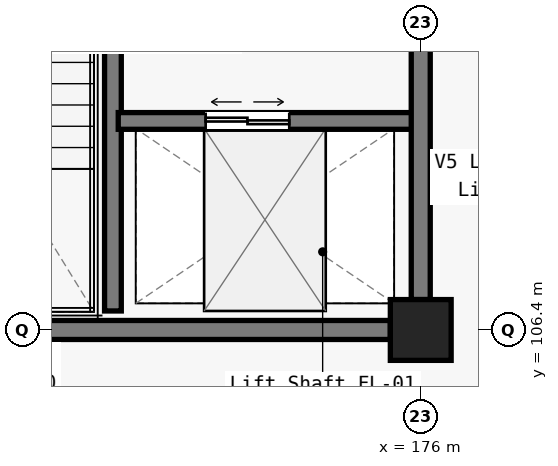
"""IFC4 building model, lengths in metres.
Left out: names, types, materials, properties, quantities, classifications, styles, units other than length and angle.
Written with IfcOpenShell. Run it as: python <this file> out.ifc"""

import sys

from ifc_helpers import new_model, si_unit, direction, frame, frame_2d, origin, origin_2d, place, context, subcontext, project, spatial, rectangle, circle, extrude, element, fill, save


model = new_model("IFC4")
c1 = context("Model", 3, precision=1e-05, world=origin(), true_north=direction((0.0, 1.0)))
c2 = subcontext(c1, "Body", "Model", "MODEL_VIEW")
j1 = project(units=[si_unit("LENGTHUNIT", "METRE"), si_unit("PLANEANGLEUNIT", "RADIAN")], contexts=[c1])
p1 = place(None, origin())
s1 = spatial("IfcSite", under=j1, at=p1, CompositionType="ELEMENT")
p2 = place(p1, origin())
s2 = spatial("IfcBuilding", under=s1, at=p2, CompositionType="ELEMENT")
p3 = place(p2, frame((0.0, 0.0, 19.8)))
s3 = spatial("IfcBuildingStorey", under=s2, at=p3, CompositionType="ELEMENT", Elevation=19.8)
p4 = place(p3, frame((176.0, 106.4, 0.0), z_axis=(0.0, 0.0, 1.0), x_axis=(1.0, 0.0, 0.0)))
e1 = element("IfcColumn", 1, at=p4, inside=s3, PredefinedType="COLUMN", context=c2, shape_type="SweptSolid", body=[
    extrude(circle(Radius=0.4, at=origin_2d()), origin(), (0.0, 0.0, 1.0), 4.8),
])
p5 = place(p3, frame((168.25, 106.4, 0.0), z_axis=(0.0, 0.0, 1.0), x_axis=(1.0, 0.0, 0.0)))
e2 = element("IfcWall", 2, at=p5, inside=s3, PredefinedType="SOLIDWALL", context=c2, shape_type="SweptSolid", body=[
    extrude(rectangle(XDim=7.35, YDim=0.25, at=frame_2d((3.675, 0.0))), origin(), (0.0, 0.0, 1.0), 3.665),
])
p6 = place(p3, frame((171.95, 106.65, 0.0), z_axis=(0.0, 0.0, 1.0), x_axis=(0.0, 1.0, 0.0)))
e3 = element("IfcWall", 3, at=p6, inside=s3, PredefinedType="SOLIDWALL", context=c2, shape_type="SweptSolid", body=[
    extrude(rectangle(XDim=7.1, YDim=0.22, at=frame_2d((3.55, 0.0))), origin(), (0.0, 0.0, 1.0), 4.54),
])
p7 = place(p6, frame((5.55, 0.0, 0.0)))
e4 = element("IfcOpeningElement", 4, at=p7, cuts=e3, PredefinedType="OPENING", context=c2, shape_type="SweptSolid", body=[
    extrude(rectangle(XDim=1.2, YDim=2.15, at=frame_2d((0.6, 1.075))), frame((0.0, 0.12, 0.0), z_axis=(0.0, -1.0, 0.0), x_axis=(1.0, 0.0, 0.0)), (0.0, 0.0, 1.0), 0.24),
])
p8 = place(p3, frame((172.02, 109.15, 0.0), z_axis=(0.0, 0.0, 1.0), x_axis=(1.0, 0.0, 0.0)))
e5 = element("IfcWall", 5, at=p8, inside=s3, PredefinedType="SOLIDWALL", context=c2, shape_type="SweptSolid", body=[
    extrude(rectangle(XDim=3.93, YDim=0.22, at=frame_2d((1.965, 0.0))), origin(), (0.0, 0.0, 1.0), 3.915),
])
p9 = place(p8, frame((1.15, 0.0, 0.0)))
e6 = element("IfcOpeningElement", 6, at=p9, cuts=e5, PredefinedType="OPENING", context=c2, shape_type="SweptSolid", body=[
    extrude(rectangle(XDim=1.1, YDim=2.2, at=frame_2d((0.55, 1.1))), frame((0.0, 0.12, 0.0), z_axis=(0.0, -1.0, 0.0), x_axis=(1.0, 0.0, 0.0)), (0.0, 0.0, 1.0), 0.24),
])
p10 = place(p3, frame((176.0, 106.8, 0.0), z_axis=(0.0, 0.0, 1.0), x_axis=(0.0, 1.0, 0.0)))
e7 = element("IfcWall", 7, at=p10, inside=s3, PredefinedType="SOLIDWALL", context=c2, shape_type="SweptSolid", body=[
    extrude(rectangle(XDim=6.875, YDim=0.25, at=frame_2d((3.438, 0.0))), origin(), (0.0, 0.0, 1.0), 3.665),
])
p11 = place(p10, frame((3.45, 0.0, 0.0)))
e8 = element("IfcOpeningElement", 8, at=p11, cuts=e7, PredefinedType="OPENING", context=c2, shape_type="SweptSolid", body=[
    extrude(rectangle(XDim=1.35, YDim=2.2, at=frame_2d((0.675, 1.1))), frame((0.0, 0.135, 0.0), z_axis=(0.0, -1.0, 0.0), x_axis=(1.0, 0.0, 0.0)), (0.0, 0.0, 1.0), 0.27),
])
p12 = place(p9, origin())
e9 = element("IfcDoor", 9, at=p12, inside=s3, OperationType="DOUBLE_DOOR_SLIDING", PredefinedType="DOOR", context=c2, shape_type="SweptSolid", body=[
    extrude(rectangle(XDim=1.1, YDim=2.2, at=frame_2d((0.55, 1.1))), frame((0.0, 0.025, 0.0), z_axis=(0.0, -1.0, 0.0), x_axis=(1.0, 0.0, 0.0)), (0.0, 0.0, 1.0), 0.05),
])
fill(e6, e9)
save(model, sys.argv[1])
